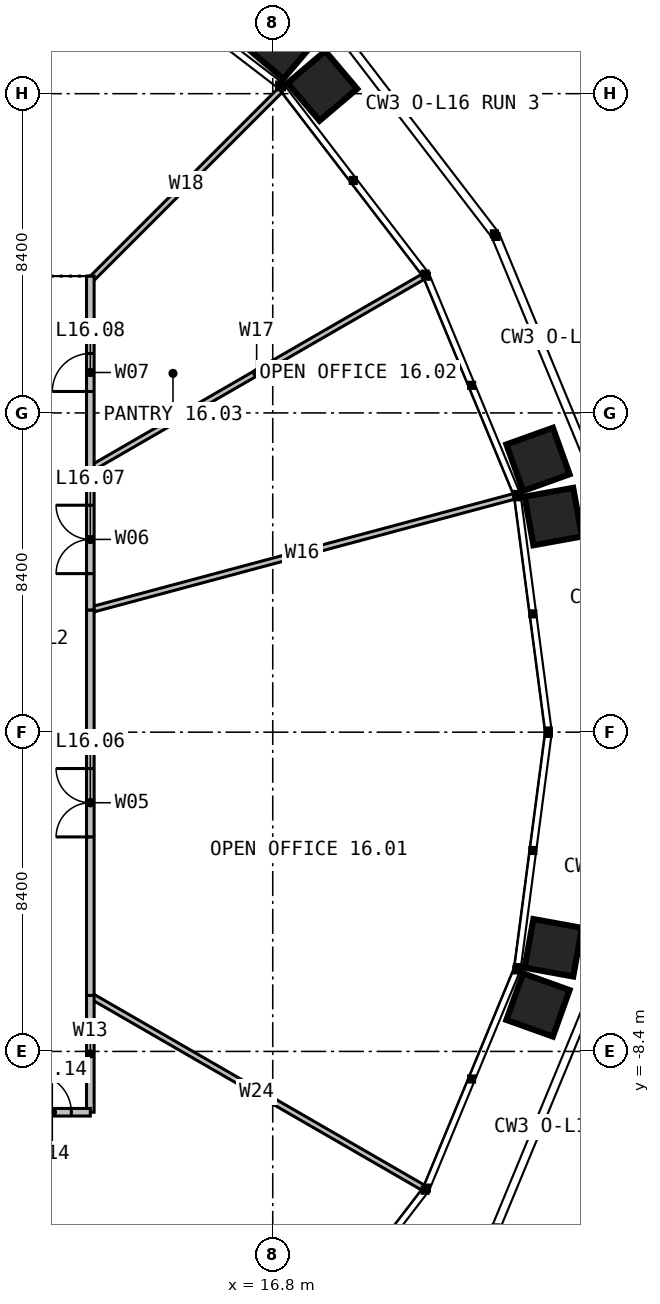
"""IFC4 building model, lengths in metres.
Left out: names, types, materials, properties, quantities, classifications, styles, units other than length and angle.
Written with IfcOpenShell. Run it as: python <this file> out.ifc"""

import sys

from ifc_helpers import new_model, si_unit, direction, frame, frame_2d, origin, place, context, subcontext, project, spatial, rectangle, extrude, element, fill, save


model = new_model("IFC4")
c1 = context("Model", 3, precision=1e-05, world=origin(), true_north=direction((0.0, 1.0)))
c2 = subcontext(c1, "Body", "Model", "MODEL_VIEW")
j1 = project(units=[si_unit("LENGTHUNIT", "METRE"), si_unit("PLANEANGLEUNIT", "RADIAN")], contexts=[c1])
p1 = place(None, origin())
s1 = spatial("IfcSite", under=j1, at=p1, CompositionType="ELEMENT")
p2 = place(p1, origin())
s2 = spatial("IfcBuilding", under=s1, at=p2, CompositionType="ELEMENT")
p3 = place(p2, frame((0.0, 0.0, 69.0)))
s3 = spatial("IfcBuildingStorey", under=s2, at=p3, CompositionType="ELEMENT", Elevation=69.0)
p4 = place(p3, frame((12.0, -6.928, 0.0), z_axis=(0.0, 0.0, 1.0), x_axis=(0.866023860286, -0.500002673408, 0.0)))
e1 = element("IfcWall", 1, at=p4, inside=s3, PredefinedType="PARTITIONING", context=c2, shape_type="SweptSolid", body=[
    extrude(rectangle(XDim=10.106, YDim=0.15, at=frame_2d((5.053, 0.0))), origin(), (0.0, 0.0, 1.0), 2.79),
])
p5 = place(p3, frame((12.0, 3.215, 0.0), z_axis=(0.0, 0.0, 1.0), x_axis=(0.96592415734, 0.258825273624, 0.0)))
e2 = element("IfcWall", 2, at=p5, inside=s3, PredefinedType="PARTITIONING", context=c2, shape_type="SweptSolid", body=[
    extrude(rectangle(XDim=11.539, YDim=0.15, at=frame_2d((5.77, 0.0))), origin(), (0.0, 0.0, 1.0), 2.79),
])
p6 = place(p3, frame((12.0, 6.928, 0.0), z_axis=(0.0, 0.0, 1.0), x_axis=(0.866023860286, 0.500002673408, 0.0)))
e3 = element("IfcWall", 3, at=p6, inside=s3, PredefinedType="PARTITIONING", context=c2, shape_type="SweptSolid", body=[
    extrude(rectangle(XDim=10.106, YDim=0.15, at=frame_2d((5.053, 0.0))), origin(), (0.0, 0.0, 1.0), 2.79),
])
p7 = place(p3, frame((12.053, 11.947, 0.0), z_axis=(0.0, 0.0, 1.0), x_axis=(0.707106781187, 0.707106781187, 0.0)))
e4 = element("IfcWall", 4, at=p7, inside=s3, PredefinedType="PARTITIONING", context=c2, shape_type="SweptSolid", body=[
    extrude(rectangle(XDim=6.992, YDim=0.15, at=frame_2d((3.496, 0.0))), origin(), (0.0, 0.0, 1.0), 2.79),
])
p8 = place(p3, frame((12.0, -6.928, 0.0), z_axis=(0.0, 0.0, 1.0), x_axis=(0.0, 1.0, 0.0)))
e5 = element("IfcWall", 5, at=p8, inside=s3, PredefinedType="PARTITIONING", context=c2, shape_type="SweptSolid", body=[
    extrude(rectangle(XDim=10.144, YDim=0.2, at=frame_2d((5.072, 0.0))), origin(), (0.0, 0.0, 1.0), 3.8),
])
p9 = place(p8, frame((4.172, 0.0, 0.0)))
e6 = element("IfcOpeningElement", 6, at=p9, cuts=e5, PredefinedType="OPENING", context=c2, shape_type="SweptSolid", body=[
    extrude(rectangle(XDim=1.8, YDim=2.2, at=frame_2d((0.9, 1.1))), frame((0.0, 0.11, 0.0), z_axis=(0.0, -1.0, 0.0), x_axis=(1.0, 0.0, 0.0)), (0.0, 0.0, 1.0), 0.22),
])
p10 = place(p3, frame((12.0, 3.215, 0.0), z_axis=(0.0, 0.0, 1.0), x_axis=(0.0, 1.0, 0.0)))
e7 = element("IfcWall", 7, at=p10, inside=s3, PredefinedType="PARTITIONING", context=c2, shape_type="SweptSolid", body=[
    extrude(rectangle(XDim=3.713, YDim=0.2, at=frame_2d((1.856, 0.0))), origin(), (0.0, 0.0, 1.0), 3.8),
])
p11 = place(p10, frame((0.956, 0.0, 0.0)))
e8 = element("IfcOpeningElement", 8, at=p11, cuts=e7, PredefinedType="OPENING", context=c2, shape_type="SweptSolid", body=[
    extrude(rectangle(XDim=1.8, YDim=2.2, at=frame_2d((0.9, 1.1))), frame((0.0, 0.11, 0.0), z_axis=(0.0, -1.0, 0.0), x_axis=(1.0, 0.0, 0.0)), (0.0, 0.0, 1.0), 0.22),
])
p12 = place(p3, frame((12.0, 6.928, 0.0), z_axis=(0.0, 0.0, 1.0), x_axis=(0.0, 1.0, 0.0)))
e9 = element("IfcWall", 9, at=p12, inside=s3, PredefinedType="PARTITIONING", context=c2, shape_type="SweptSolid", body=[
    extrude(rectangle(XDim=5.072, YDim=0.2, at=frame_2d((2.536, 0.0))), origin(), (0.0, 0.0, 1.0), 3.8),
])
p13 = place(p12, frame((2.036, 0.0, 0.0)))
e10 = element("IfcOpeningElement", 10, at=p13, cuts=e9, PredefinedType="OPENING", context=c2, shape_type="SweptSolid", body=[
    extrude(rectangle(XDim=1.0, YDim=2.2, at=frame_2d((0.5, 1.1))), frame((0.0, 0.11, 0.0), z_axis=(0.0, -1.0, 0.0), x_axis=(1.0, 0.0, 0.0)), (0.0, 0.0, 1.0), 0.22),
])
p14 = place(p3, frame((12.0, -10.0, 0.0), z_axis=(0.0, 0.0, 1.0), x_axis=(0.0, 1.0, 0.0)))
e11 = element("IfcWall", 11, at=p14, inside=s3, PredefinedType="PARTITIONING", context=c2, shape_type="SweptSolid", body=[
    extrude(rectangle(XDim=3.072, YDim=0.2, at=frame_2d((1.536, 0.0))), origin(), (0.0, 0.0, 1.0), 3.8),
])
p15 = place(p3, frame((10.0, -10.0, 0.0), z_axis=(0.0, 0.0, 1.0), x_axis=(1.0, 0.0, 0.0)))
e12 = element("IfcWall", 12, at=p15, inside=s3, PredefinedType="PARTITIONING", context=c2, shape_type="SweptSolid", body=[
    extrude(rectangle(XDim=2.0, YDim=0.2, at=frame_2d((1.0, 0.0))), origin(), (0.0, 0.0, 1.0), 3.8),
])
p16 = place(p15, frame((0.5, 0.0, 0.0)))
e13 = element("IfcOpeningElement", 13, at=p16, cuts=e12, PredefinedType="OPENING", context=c2, shape_type="SweptSolid", body=[
    extrude(rectangle(XDim=1.0, YDim=2.2, at=frame_2d((0.5, 1.1))), frame((0.0, 0.11, 0.0), z_axis=(0.0, -1.0, 0.0), x_axis=(1.0, 0.0, 0.0)), (0.0, 0.0, 1.0), 0.22),
])
p17 = place(p9, origin())
e14 = element("IfcDoor", 14, at=p17, inside=s3, OperationType="DOUBLE_DOOR_SINGLE_SWING", PredefinedType="DOOR", context=c2, shape_type="SweptSolid", body=[
    extrude(rectangle(XDim=1.8, YDim=2.2, at=frame_2d((0.9, 1.1))), frame((0.0, 0.025, 0.0), z_axis=(0.0, -1.0, 0.0), x_axis=(1.0, 0.0, 0.0)), (0.0, 0.0, 1.0), 0.05),
])
fill(e6, e14)
p18 = place(p11, origin())
e15 = element("IfcDoor", 15, at=p18, inside=s3, OperationType="DOUBLE_DOOR_SINGLE_SWING", PredefinedType="DOOR", context=c2, shape_type="SweptSolid", body=[
    extrude(rectangle(XDim=1.8, YDim=2.2, at=frame_2d((0.9, 1.1))), frame((0.0, 0.025, 0.0), z_axis=(0.0, -1.0, 0.0), x_axis=(1.0, 0.0, 0.0)), (0.0, 0.0, 1.0), 0.05),
])
fill(e8, e15)
p19 = place(p13, origin())
e16 = element("IfcDoor", 16, at=p19, inside=s3, OperationType="SINGLE_SWING_LEFT", PredefinedType="DOOR", context=c2, shape_type="SweptSolid", body=[
    extrude(rectangle(XDim=1.0, YDim=2.2, at=frame_2d((0.5, 1.1))), frame((0.0, 0.025, 0.0), z_axis=(0.0, -1.0, 0.0), x_axis=(1.0, 0.0, 0.0)), (0.0, 0.0, 1.0), 0.05),
])
fill(e10, e16)
p20 = place(p16, origin())
e17 = element("IfcDoor", 17, at=p20, inside=s3, OperationType="SINGLE_SWING_LEFT", PredefinedType="DOOR", context=c2, shape_type="SweptSolid", body=[
    extrude(rectangle(XDim=1.0, YDim=2.2, at=frame_2d((0.5, 1.1))), frame((0.0, 0.025, 0.0), z_axis=(0.0, -1.0, 0.0), x_axis=(1.0, 0.0, 0.0)), (0.0, 0.0, 1.0), 0.05),
])
fill(e13, e17)
save(model, sys.argv[1])
